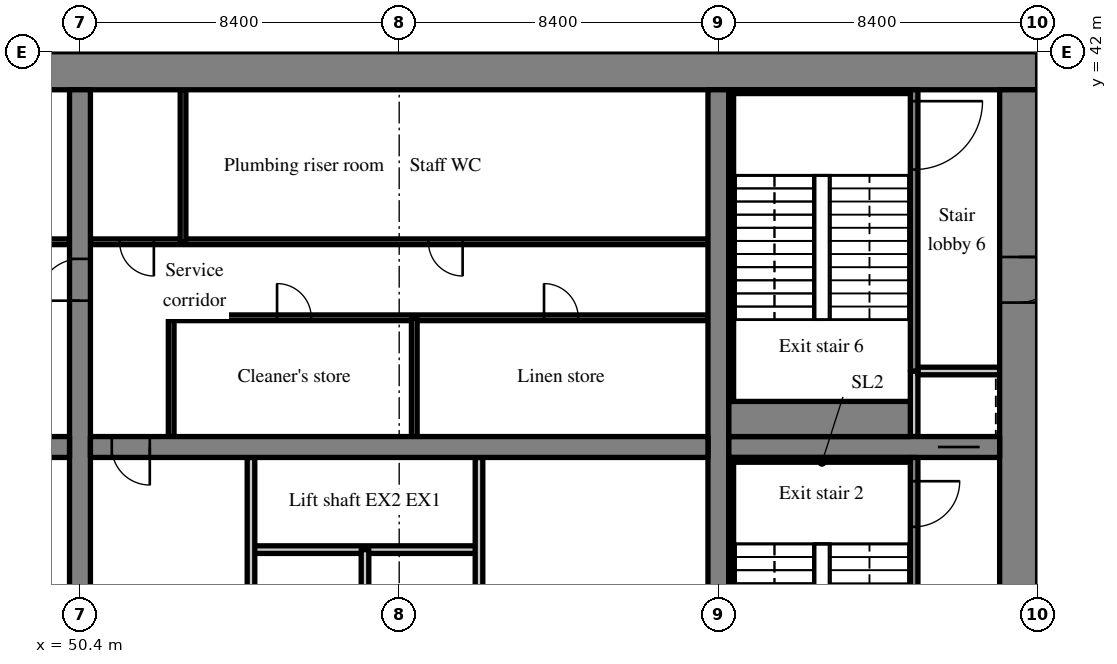
"""IFC4 building model, lengths in metres.
Left out: names, types, materials, properties, quantities, classifications, styles, units other than length and angle.
Written with IfcOpenShell. Run it as: python <this file> out.ifc"""

import sys

from ifc_helpers import new_model, si_unit, direction, frame, frame_2d, origin, place, context, subcontext, project, spatial, rectangle, extrude, source, transform, mapped, element, fill, save


model = new_model("IFC4")
c1 = context("Model", 3, precision=1e-05, world=origin(), true_north=direction((0.0, 1.0)))
c2 = subcontext(c1, "Body", "Model", "MODEL_VIEW")
j1 = project(units=[si_unit("LENGTHUNIT", "METRE"), si_unit("PLANEANGLEUNIT", "RADIAN")], contexts=[c1])
p1 = place(None, origin())
s1 = spatial("IfcSite", under=j1, at=p1, CompositionType="ELEMENT")
p2 = place(p1, origin())
s2 = spatial("IfcBuilding", under=s1, at=p2, CompositionType="ELEMENT")
p3 = place(p2, frame((0.0, 0.0, 54.4)))
s3 = spatial("IfcBuildingStorey", under=s2, at=p3, CompositionType="ELEMENT", Elevation=54.4)
m1 = source(origin(), c2, "Body", "SweptSolid", [
    extrude(rectangle(XDim=50.4, YDim=1.0, at=frame_2d((25.2, 0.0))), origin(), (0.0, 0.0, 1.0), 3.52),
])
p4 = place(p3, frame((25.2, 41.5, 0.0), z_axis=(0.0, 0.0, 1.0), x_axis=(1.0, 0.0, 0.0)))
e1 = element("IfcWall", 1, at=p4, inside=s3, PredefinedType="SHEAR", context=c2, shape_type="MappedRepresentation", body=[
    mapped(m1, transform((0.0, 0.0, 0.0), scale=1.0)),
])
m2 = source(origin(), c2, "Body", "SweptSolid", [
    extrude(rectangle(XDim=18.0, YDim=1.0, at=frame_2d((9.0, 0.0))), origin(), (0.0, 0.0, 1.0), 3.52),
])
p5 = place(p3, frame((75.1, 23.0, 0.0), z_axis=(0.0, 0.0, 1.0), x_axis=(0.0, 1.0, 0.0)))
e2 = element("IfcWall", 2, at=p5, inside=s3, PredefinedType="SHEAR", context=c2, shape_type="MappedRepresentation", body=[
    mapped(m2, transform((0.0, 0.0, 0.0), scale=1.0)),
])
m3 = source(origin(), c2, "Body", "SweptSolid", [
    extrude(rectangle(XDim=1.2, YDim=2.1, at=frame_2d((0.6, 1.05))), frame((0.0, 0.51, 0.0), z_axis=(0.0, -1.0, 0.0), x_axis=(1.0, 0.0, 0.0)), (0.0, 0.0, 1.0), 1.02),
])
p6 = place(p5, frame((12.4, 0.0, 0.0)))
e3 = element("IfcOpeningElement", 3, at=p6, cuts=e2, PredefinedType="OPENING", context=c2, shape_type="MappedRepresentation", body=[
    mapped(m3, transform((0.0, 0.0, 0.0), scale=1.0)),
])
m4 = source(origin(), c2, "Body", "SweptSolid", [
    extrude(rectangle(XDim=18.0, YDim=0.55, at=frame_2d((9.0, 0.0))), origin(), (0.0, 0.0, 1.0), 3.52),
])
p7 = place(p3, frame((50.4, 23.0, 0.0), z_axis=(0.0, 0.0, 1.0), x_axis=(0.0, 1.0, 0.0)))
e4 = element("IfcWall", 4, at=p7, inside=s3, PredefinedType="SHEAR", context=c2, shape_type="MappedRepresentation", body=[
    mapped(m4, transform((0.0, 0.0, 0.0), scale=1.0)),
])
m5 = source(origin(), c2, "Body", "SweptSolid", [
    extrude(rectangle(XDim=1.1, YDim=2.1, at=frame_2d((0.55, 1.05))), frame((0.0, 0.285, 0.0), z_axis=(0.0, -1.0, 0.0), x_axis=(1.0, 0.0, 0.0)), (0.0, 0.0, 1.0), 0.57),
])
p8 = place(p7, frame((12.45, 0.0, 0.0)))
e5 = element("IfcOpeningElement", 5, at=p8, cuts=e4, PredefinedType="OPENING", context=c2, shape_type="MappedRepresentation", body=[
    mapped(m5, transform((0.0, 0.0, 0.0), scale=1.0)),
])
p9 = place(p3, frame((67.2, 23.0, 0.0), z_axis=(0.0, 0.0, 1.0), x_axis=(0.0, 1.0, 0.0)))
e6 = element("IfcWall", 6, at=p9, inside=s3, PredefinedType="SHEAR", context=c2, shape_type="MappedRepresentation", body=[
    mapped(m4, transform((0.0, 0.0, 0.0), scale=1.0)),
])
m6 = source(origin(), c2, "Body", "SweptSolid", [
    extrude(rectangle(XDim=16.25, YDim=0.55, at=frame_2d((8.125, 0.0))), origin(), (0.0, 0.0, 1.0), 3.52),
])
p10 = place(p3, frame((33.875, 31.6, 0.0), z_axis=(0.0, 0.0, 1.0), x_axis=(1.0, 0.0, 0.0)))
e7 = element("IfcWall", 7, at=p10, inside=s3, PredefinedType="SHEAR", context=c2, shape_type="MappedRepresentation", body=[
    mapped(m6, transform((0.0, 0.0, 0.0), scale=1.0)),
])
m7 = source(origin(), c2, "Body", "SweptSolid", [
    extrude(rectangle(XDim=1.0, YDim=2.1, at=frame_2d((0.5, 1.05))), frame((0.0, 0.285, 0.0), z_axis=(0.0, -1.0, 0.0), x_axis=(1.0, 0.0, 0.0)), (0.0, 0.0, 1.0), 0.57),
])
p11 = place(p10, frame((14.687, 0.0, 0.0)))
e8 = element("IfcOpeningElement", 8, at=p11, cuts=e7, PredefinedType="OPENING", context=c2, shape_type="MappedRepresentation", body=[
    mapped(m7, transform((0.0, 0.0, 0.0), scale=1.0)),
])
p12 = place(p3, frame((50.675, 31.6, 0.0), z_axis=(0.0, 0.0, 1.0), x_axis=(1.0, 0.0, 0.0)))
e9 = element("IfcWall", 9, at=p12, inside=s3, PredefinedType="SHEAR", context=c2, shape_type="MappedRepresentation", body=[
    mapped(m6, transform((0.0, 0.0, 0.0), scale=1.0)),
])
p13 = place(p12, frame((0.562, 0.0, 0.0)))
e10 = element("IfcOpeningElement", 10, at=p13, cuts=e9, PredefinedType="OPENING", context=c2, shape_type="MappedRepresentation", body=[
    mapped(m7, transform((0.0, 0.0, 0.0), scale=1.0)),
])
m8 = source(origin(), c2, "Body", "SweptSolid", [
    extrude(rectangle(XDim=7.125, YDim=0.55, at=frame_2d((3.562, 0.0))), origin(), (0.0, 0.0, 1.0), 3.52),
])
p14 = place(p3, frame((67.475, 31.6, 0.0), z_axis=(0.0, 0.0, 1.0), x_axis=(1.0, 0.0, 0.0)))
e11 = element("IfcWall", 11, at=p14, inside=s3, PredefinedType="SHEAR", context=c2, shape_type="MappedRepresentation", body=[
    mapped(m8, transform((0.0, 0.0, 0.0), scale=1.0)),
])
p15 = place(p14, frame((5.5, 0.0, 0.0)))
e12 = element("IfcOpeningElement", 12, at=p15, cuts=e11, PredefinedType="OPENING", context=c2, shape_type="MappedRepresentation", body=[
    mapped(m5, transform((0.0, 0.0, 0.0), scale=1.0)),
])
m9 = source(origin(), c2, "Body", "SweptSolid", [
    extrude(rectangle(XDim=3.559, YDim=0.3, at=frame_2d((1.78, 0.0))), origin(), (0.0, 0.0, 1.0), 3.52),
])
p16 = place(p3, frame((76.523, 43.292, 0.0), z_axis=(0.0, 0.0, 1.0), x_axis=(-0.35779745313, -0.933799219604, 0.0)))
e13 = element("IfcWall", 13, at=p16, inside=s3, PredefinedType="SOLIDWALL", context=c2, shape_type="MappedRepresentation", body=[
    mapped(m9, transform((0.0, 0.0, 0.0), scale=1.0)),
])
m10 = source(origin(), c2, "Body", "SweptSolid", [
    extrude(rectangle(XDim=1.5, YDim=2.0, at=frame_2d((0.75, 1.0))), frame((0.0, 0.16, 0.0), z_axis=(0.0, -1.0, 0.0), x_axis=(1.0, 0.0, 0.0)), (0.0, 0.0, 1.0), 0.32),
])
p17 = place(p16, frame((0.156, 0.0, 0.9)))
e14 = element("IfcOpeningElement", 14, at=p17, cuts=e13, PredefinedType="OPENING", context=c2, shape_type="MappedRepresentation", body=[
    mapped(m10, transform((0.0, 0.0, 0.0), scale=1.0)),
])
m11 = source(origin(), c2, "Body", "SweptSolid", [
    extrude(rectangle(XDim=16.25, YDim=0.15, at=frame_2d((8.125, 0.0))), origin(), (0.0, 0.0, 1.0), 3.52),
])
p18 = place(p3, frame((33.875, 37.0, 0.0), z_axis=(0.0, 0.0, 1.0), x_axis=(1.0, 0.0, 0.0)))
e15 = element("IfcWall", 15, at=p18, inside=s3, PredefinedType="PARTITIONING", context=c2, shape_type="MappedRepresentation", body=[
    mapped(m11, transform((0.0, 0.0, 0.0), scale=1.0)),
])
m12 = source(origin(), c2, "Body", "SweptSolid", [
    extrude(rectangle(XDim=0.9, YDim=2.1, at=frame_2d((0.45, 1.05))), frame((0.0, 0.085, 0.0), z_axis=(0.0, -1.0, 0.0), x_axis=(1.0, 0.0, 0.0)), (0.0, 0.0, 1.0), 0.17),
])
p19 = place(p18, frame((0.769, 0.0, 0.0)))
e16 = element("IfcOpeningElement", 16, at=p19, cuts=e15, PredefinedType="OPENING", context=c2, shape_type="MappedRepresentation", body=[
    mapped(m12, transform((0.0, 0.0, 0.0), scale=1.0)),
])
p20 = place(p18, frame((3.613, 0.0, 0.0)))
e17 = element("IfcOpeningElement", 17, at=p20, cuts=e15, PredefinedType="OPENING", context=c2, shape_type="MappedRepresentation", body=[
    mapped(m12, transform((0.0, 0.0, 0.0), scale=1.0)),
])
p21 = place(p18, frame((9.3, 0.0, 0.0)))
e18 = element("IfcOpeningElement", 18, at=p21, cuts=e15, PredefinedType="OPENING", context=c2, shape_type="MappedRepresentation", body=[
    mapped(m12, transform((0.0, 0.0, 0.0), scale=1.0)),
])
p22 = place(p18, frame((14.581, 0.0, 0.0)))
e19 = element("IfcOpeningElement", 19, at=p22, cuts=e15, PredefinedType="OPENING", context=c2, shape_type="MappedRepresentation", body=[
    mapped(m12, transform((0.0, 0.0, 0.0), scale=1.0)),
])
m13 = source(origin(), c2, "Body", "SweptSolid", [
    extrude(rectangle(XDim=6.0, YDim=0.2, at=frame_2d((3.0, 0.0))), origin(), (0.0, 0.0, 1.0), 3.52),
])
p23 = place(p3, frame((60.9, 28.9, 0.0), z_axis=(0.0, 0.0, 1.0), x_axis=(-1.0, 0.0, 0.0)))
e20 = element("IfcWall", 20, at=p23, inside=s3, PredefinedType="SOLIDWALL", context=c2, shape_type="MappedRepresentation", body=[
    mapped(m13, transform((0.0, 0.0, 0.0), scale=1.0)),
])
m14 = source(origin(), c2, "Body", "SweptSolid", [
    extrude(rectangle(XDim=8.325, YDim=0.2, at=frame_2d((4.163, 0.0))), origin(), (0.0, 0.0, 1.0), 3.52),
])
for number, where, z_axis, x_axis in (
    (21, (54.9, 23.0, 0.0), (0.0, 0.0, 1.0), (0.0, 1.0, 0.0)),
    (22, (60.9, 23.0, 0.0), (0.0, 0.0, 1.0), (0.0, 1.0, 0.0)),
):
    element("IfcWall", number, at=place(p3, frame(where, z_axis=z_axis, x_axis=x_axis)), inside=s3, PredefinedType="PARTITIONING", context=c2, shape_type="MappedRepresentation", body=[
        mapped(m14, transform((0.0, 0.0, 0.0), scale=1.0)),
    ])
m15 = source(origin(), c2, "Body", "SweptSolid", [
    extrude(rectangle(XDim=5.9, YDim=0.2, at=frame_2d((2.95, 0.0))), origin(), (0.0, 0.0, 1.0), 3.52),
])
p24 = place(p3, frame((57.9, 23.0, 0.0), z_axis=(0.0, 0.0, 1.0), x_axis=(0.0, 1.0, 0.0)))
e23 = element("IfcWall", 23, at=p24, inside=s3, PredefinedType="PARTITIONING", context=c2, shape_type="MappedRepresentation", body=[
    mapped(m15, transform((0.0, 0.0, 0.0), scale=1.0)),
])
m16 = source(origin(), c2, "Body", "SweptSolid", [
    extrude(rectangle(XDim=3.125, YDim=0.15, at=frame_2d((1.562, 0.0))), origin(), (0.0, 0.0, 1.0), 3.52),
])
p25 = place(p3, frame((52.8, 31.875, 0.0), z_axis=(0.0, 0.0, 1.0), x_axis=(0.0, 1.0, 0.0)))
e24 = element("IfcWall", 24, at=p25, inside=s3, PredefinedType="PARTITIONING", context=c2, shape_type="MappedRepresentation", body=[
    mapped(m16, transform((0.0, 0.0, 0.0), scale=1.0)),
])
m17 = source(origin(), c2, "Body", "SweptSolid", [
    extrude(rectangle(XDim=14.125, YDim=0.15, at=frame_2d((7.062, 0.0))), origin(), (0.0, 0.0, 1.0), 3.52),
])
p26 = place(p3, frame((66.925, 35.0, 0.0), z_axis=(0.0, 0.0, 1.0), x_axis=(-1.0, 0.0, 0.0)))
e25 = element("IfcWall", 25, at=p26, inside=s3, PredefinedType="PARTITIONING", context=c2, shape_type="MappedRepresentation", body=[
    mapped(m17, transform((0.0, 0.0, 0.0), scale=1.0)),
])
p27 = place(p26, frame((3.414, 0.0, 0.0)))
e26 = element("IfcOpeningElement", 26, at=p27, cuts=e25, PredefinedType="OPENING", context=c2, shape_type="MappedRepresentation", body=[
    mapped(m12, transform((0.0, 0.0, 0.0), scale=1.0)),
])
p28 = place(p26, frame((10.439, 0.0, 0.0)))
e27 = element("IfcOpeningElement", 27, at=p28, cuts=e25, PredefinedType="OPENING", context=c2, shape_type="MappedRepresentation", body=[
    mapped(m12, transform((0.0, 0.0, 0.0), scale=1.0)),
])
p29 = place(p3, frame((66.925, 37.0, 0.0), z_axis=(0.0, 0.0, 1.0), x_axis=(-1.0, 0.0, 0.0)))
e28 = element("IfcWall", 28, at=p29, inside=s3, PredefinedType="PARTITIONING", context=c2, shape_type="MappedRepresentation", body=[
    mapped(m11, transform((0.0, 0.0, 0.0), scale=1.0)),
])
p30 = place(p29, frame((6.456, 0.0, 0.0)))
e29 = element("IfcOpeningElement", 29, at=p30, cuts=e28, PredefinedType="OPENING", context=c2, shape_type="MappedRepresentation", body=[
    mapped(m12, transform((0.0, 0.0, 0.0), scale=1.0)),
])
p31 = place(p29, frame((14.581, 0.0, 0.0)))
e30 = element("IfcOpeningElement", 30, at=p31, cuts=e28, PredefinedType="OPENING", context=c2, shape_type="MappedRepresentation", body=[
    mapped(m12, transform((0.0, 0.0, 0.0), scale=1.0)),
])
p32 = place(p3, frame((59.197, 31.875, 0.0), z_axis=(0.0, 0.0, 1.0), x_axis=(0.0, 1.0, 0.0)))
e31 = element("IfcWall", 31, at=p32, inside=s3, PredefinedType="PARTITIONING", context=c2, shape_type="MappedRepresentation", body=[
    mapped(m16, transform((0.0, 0.0, 0.0), scale=1.0)),
])
m18 = source(origin(), c2, "Body", "SweptSolid", [
    extrude(rectangle(XDim=4.0, YDim=0.15, at=frame_2d((2.0, 0.0))), origin(), (0.0, 0.0, 1.0), 3.52),
])
p33 = place(p3, frame((53.112, 37.0, 0.0), z_axis=(0.0, 0.0, 1.0), x_axis=(0.0, 1.0, 0.0)))
e32 = element("IfcWall", 32, at=p33, inside=s3, PredefinedType="PARTITIONING", context=c2, shape_type="MappedRepresentation", body=[
    mapped(m18, transform((0.0, 0.0, 0.0), scale=1.0)),
])
m19 = source(origin(), c2, "Body", "SweptSolid", [
    extrude(rectangle(XDim=8.325, YDim=0.2, at=frame_2d((4.163, 0.0))), origin(), (0.0, 0.0, 1.0), 3.52),
])
p34 = place(p3, frame((72.35, 23.0, 0.0), z_axis=(0.0, 0.0, 1.0), x_axis=(0.0, 1.0, 0.0)))
e33 = element("IfcWall", 33, at=p34, inside=s3, PredefinedType="SOLIDWALL", context=c2, shape_type="MappedRepresentation", body=[
    mapped(m19, transform((0.0, 0.0, 0.0), scale=1.0)),
])
m20 = source(origin(), c2, "Body", "SweptSolid", [
    extrude(rectangle(XDim=1.2, YDim=2.1, at=frame_2d((0.6, 1.05))), frame((0.0, 0.11, 0.0), z_axis=(0.0, -1.0, 0.0), x_axis=(1.0, 0.0, 0.0)), (0.0, 0.0, 1.0), 0.22),
])
p35 = place(p34, frame((6.5, 0.0, 0.0)))
e34 = element("IfcOpeningElement", 34, at=p35, cuts=e33, PredefinedType="OPENING", context=c2, shape_type="MappedRepresentation", body=[
    mapped(m20, transform((0.0, 0.0, 0.0), scale=1.0)),
])
m21 = source(origin(), c2, "Body", "SweptSolid", [
    extrude(rectangle(XDim=1.725, YDim=0.2, at=frame_2d((0.863, 0.0))), origin(), (0.0, 0.0, 1.0), 3.52),
])
p36 = place(p3, frame((72.35, 31.875, 0.0), z_axis=(0.0, 0.0, 1.0), x_axis=(0.0, 1.0, 0.0)))
e35 = element("IfcWall", 35, at=p36, inside=s3, PredefinedType="SOLIDWALL", context=c2, shape_type="MappedRepresentation", body=[
    mapped(m21, transform((0.0, 0.0, 0.0), scale=1.0)),
])
m22 = source(origin(), c2, "Body", "SweptSolid", [
    extrude(rectangle(XDim=2.15, YDim=0.2, at=frame_2d((1.075, 0.0))), origin(), (0.0, 0.0, 1.0), 3.52),
])
p37 = place(p3, frame((72.45, 33.6, 0.0), z_axis=(0.0, 0.0, 1.0), x_axis=(1.0, 0.0, 0.0)))
e36 = element("IfcWall", 36, at=p37, inside=s3, PredefinedType="SOLIDWALL", context=c2, shape_type="MappedRepresentation", body=[
    mapped(m22, transform((0.0, 0.0, 0.0), scale=1.0)),
])
m23 = source(origin(), c2, "Body", "SweptSolid", [
    extrude(rectangle(XDim=7.4, YDim=0.2, at=frame_2d((3.7, 0.0))), origin(), (0.0, 0.0, 1.0), 3.52),
])
p38 = place(p3, frame((72.35, 33.6, 0.0), z_axis=(0.0, 0.0, 1.0), x_axis=(0.0, 1.0, 0.0)))
e37 = element("IfcWall", 37, at=p38, inside=s3, PredefinedType="SOLIDWALL", context=c2, shape_type="MappedRepresentation", body=[
    mapped(m23, transform((0.0, 0.0, 0.0), scale=1.0)),
])
m24 = source(origin(), c2, "Body", "SweptSolid", [
    extrude(rectangle(XDim=1.8, YDim=2.1, at=frame_2d((0.9, 1.05))), frame((0.0, 0.11, 0.0), z_axis=(0.0, -1.0, 0.0), x_axis=(1.0, 0.0, 0.0)), (0.0, 0.0, 1.0), 0.22),
])
p39 = place(p38, frame((5.3, 0.0, 0.0)))
e38 = element("IfcOpeningElement", 38, at=p39, cuts=e37, PredefinedType="OPENING", context=c2, shape_type="MappedRepresentation", body=[
    mapped(m24, transform((0.0, 0.0, 0.0), scale=1.0)),
])
m25 = source(origin(), c2, "Body", "SweptSolid", [
    extrude(rectangle(XDim=8.2, YDim=0.2, at=frame_2d((4.1, 0.0))), origin(), (0.0, 0.0, 1.0), 3.52),
])
p40 = place(p3, frame((83.8, 30.4, 0.0), z_axis=(0.0, 0.0, 1.0), x_axis=(-1.0, 0.0, 0.0)))
e39 = element("IfcWall", 39, at=p40, inside=s3, PredefinedType="SOLIDWALL", context=c2, shape_type="MappedRepresentation", body=[
    mapped(m25, transform((0.0, 0.0, 0.0), scale=1.0)),
])
m26 = source(origin(), c2, "Body", "SweptSolid", [
    extrude(rectangle(XDim=1.0, YDim=2.1, at=frame_2d((0.5, 1.05))), frame((0.0, 0.11, 0.0), z_axis=(0.0, -1.0, 0.0), x_axis=(1.0, 0.0, 0.0)), (0.0, 0.0, 1.0), 0.22),
])
p41 = place(p40, frame((6.1, 0.0, 0.0)))
e40 = element("IfcOpeningElement", 40, at=p41, cuts=e39, PredefinedType="OPENING", context=c2, shape_type="MappedRepresentation", body=[
    mapped(m26, transform((0.0, 0.0, 0.0), scale=1.0)),
])
m27 = source(origin(), c2, "Body", "SweptSolid", [
    extrude(rectangle(XDim=4.775, YDim=0.125, at=frame_2d((2.387, 0.0))), origin(), (0.0, 0.0, 1.0), 3.52),
])
p42 = place(p3, frame((67.475, 31.262, 0.0), z_axis=(0.0, 0.0, 1.0), x_axis=(1.0, 0.0, 0.0)))
e41 = element("IfcWall", 41, at=p42, inside=s3, PredefinedType="SOLIDWALL", context=c2, shape_type="MappedRepresentation", body=[
    mapped(m27, transform((0.0, 0.0, 0.0), scale=1.0)),
])
m28 = source(origin(), c2, "Body", "SweptSolid", [
    extrude(rectangle(XDim=8.1, YDim=0.125, at=frame_2d((4.05, 0.0))), origin(), (0.0, 0.0, 1.0), 3.52),
])
p43 = place(p3, frame((67.537, 23.1, 0.0), z_axis=(0.0, 0.0, 1.0), x_axis=(0.0, 1.0, 0.0)))
e42 = element("IfcWall", 42, at=p43, inside=s3, PredefinedType="SOLIDWALL", context=c2, shape_type="MappedRepresentation", body=[
    mapped(m28, transform((0.0, 0.0, 0.0), scale=1.0)),
])
m29 = source(origin(), c2, "Body", "SweptSolid", [
    extrude(rectangle(XDim=4.775, YDim=0.1, at=frame_2d((2.387, 0.0))), origin(), (0.0, 0.0, 1.0), 3.52),
])
p44 = place(p3, frame((67.475, 40.95, 0.0), z_axis=(0.0, 0.0, 1.0), x_axis=(1.0, 0.0, 0.0)))
e43 = element("IfcWall", 43, at=p44, inside=s3, PredefinedType="SOLIDWALL", context=c2, shape_type="MappedRepresentation", body=[
    mapped(m29, transform((0.0, 0.0, 0.0), scale=1.0)),
])
m30 = source(origin(), c2, "Body", "SweptSolid", [
    extrude(rectangle(XDim=4.775, YDim=0.925, at=frame_2d((2.387, 0.0))), origin(), (0.0, 0.0, 1.0), 3.52),
])
p45 = place(p3, frame((67.475, 32.337, 0.0), z_axis=(0.0, 0.0, 1.0), x_axis=(1.0, 0.0, 0.0)))
e44 = element("IfcWall", 44, at=p45, inside=s3, PredefinedType="SOLIDWALL", context=c2, shape_type="MappedRepresentation", body=[
    mapped(m30, transform((0.0, 0.0, 0.0), scale=1.0)),
])
p46 = place(p3, frame((67.537, 32.8, 0.0), z_axis=(0.0, 0.0, 1.0), x_axis=(0.0, 1.0, 0.0)))
e45 = element("IfcWall", 45, at=p46, inside=s3, PredefinedType="SOLIDWALL", context=c2, shape_type="MappedRepresentation", body=[
    mapped(m28, transform((0.0, 0.0, 0.0), scale=1.0)),
])
m31 = source(origin(), c2, "Body", "SweptSolid", [
    extrude(rectangle(XDim=1.0, YDim=2.1, at=frame_2d((0.5, 1.05))), frame((0.0, 0.025, 0.0), z_axis=(0.0, -1.0, 0.0), x_axis=(1.0, 0.0, 0.0)), (0.0, 0.0, 1.0), 0.05),
])
p47 = place(p13, origin())
e46 = element("IfcDoor", 46, at=p47, inside=s3, OperationType="SINGLE_SWING_RIGHT", PredefinedType="DOOR", context=c2, shape_type="MappedRepresentation", body=[
    mapped(m31, transform((0.0, 0.0, 0.0), scale=1.0)),
])
fill(e10, e46)
m32 = source(origin(), c2, "Body", "SweptSolid", [
    extrude(rectangle(XDim=0.9, YDim=2.1, at=frame_2d((0.45, 1.05))), frame((0.0, 0.025, 0.0), z_axis=(0.0, -1.0, 0.0), x_axis=(1.0, 0.0, 0.0)), (0.0, 0.0, 1.0), 0.05),
])
p48 = place(p27, origin())
e47 = element("IfcDoor", 47, at=p48, inside=s3, OperationType="SINGLE_SWING_RIGHT", PredefinedType="DOOR", context=c2, shape_type="MappedRepresentation", body=[
    mapped(m32, transform((0.0, 0.0, 0.0), scale=1.0)),
])
fill(e26, e47)
p49 = place(p28, origin())
e48 = element("IfcDoor", 48, at=p49, inside=s3, OperationType="SINGLE_SWING_RIGHT", PredefinedType="DOOR", context=c2, shape_type="MappedRepresentation", body=[
    mapped(m32, transform((0.0, 0.0, 0.0), scale=1.0)),
])
fill(e27, e48)
p50 = place(p30, origin())
e49 = element("IfcDoor", 49, at=p50, inside=s3, OperationType="SINGLE_SWING_LEFT", PredefinedType="DOOR", context=c2, shape_type="MappedRepresentation", body=[
    mapped(m32, transform((0.0, 0.0, 0.0), scale=1.0)),
])
fill(e29, e49)
p51 = place(p31, origin())
e50 = element("IfcDoor", 50, at=p51, inside=s3, OperationType="SINGLE_SWING_LEFT", PredefinedType="DOOR", context=c2, shape_type="MappedRepresentation", body=[
    mapped(m32, transform((0.0, 0.0, 0.0), scale=1.0)),
])
fill(e30, e50)
m33 = source(origin(), c2, "Body", "SweptSolid", [
    extrude(rectangle(XDim=1.2, YDim=2.1, at=frame_2d((0.6, 1.05))), frame((0.0, 0.025, 0.0), z_axis=(0.0, -1.0, 0.0), x_axis=(1.0, 0.0, 0.0)), (0.0, 0.0, 1.0), 0.05),
])
p52 = place(p35, origin())
e51 = element("IfcDoor", 51, at=p52, inside=s3, OperationType="SINGLE_SWING_RIGHT", PredefinedType="DOOR", context=c2, shape_type="MappedRepresentation", body=[
    mapped(m33, transform((0.0, 0.0, 0.0), scale=1.0)),
])
fill(e34, e51)
m34 = source(origin(), c2, "Body", "SweptSolid", [
    extrude(rectangle(XDim=1.1, YDim=2.1, at=frame_2d((0.55, 1.05))), frame((0.0, 0.025, 0.0), z_axis=(0.0, -1.0, 0.0), x_axis=(1.0, 0.0, 0.0)), (0.0, 0.0, 1.0), 0.05),
])
p53 = place(p15, origin())
e52 = element("IfcDoor", 52, at=p53, inside=s3, OperationType="SLIDING_TO_LEFT", PredefinedType="DOOR", context=c2, shape_type="MappedRepresentation", body=[
    mapped(m34, transform((0.0, 0.0, 0.0), scale=1.0)),
])
fill(e12, e52)
m35 = source(origin(), c2, "Body", "SweptSolid", [
    extrude(rectangle(XDim=1.8, YDim=2.1, at=frame_2d((0.9, 1.05))), frame((0.0, 0.025, 0.0), z_axis=(0.0, -1.0, 0.0), x_axis=(1.0, 0.0, 0.0)), (0.0, 0.0, 1.0), 0.05),
])
p54 = place(p39, origin())
e53 = element("IfcDoor", 53, at=p54, inside=s3, OperationType="SINGLE_SWING_RIGHT", PredefinedType="DOOR", context=c2, shape_type="MappedRepresentation", body=[
    mapped(m35, transform((0.0, 0.0, 0.0), scale=1.0)),
])
fill(e38, e53)
p55 = place(p6, origin())
e54 = element("IfcDoor", 54, at=p55, inside=s3, OperationType="SINGLE_SWING_RIGHT", PredefinedType="DOOR", context=c2, shape_type="MappedRepresentation", body=[
    mapped(m33, transform((0.0, 0.0, 0.0), scale=1.0)),
])
fill(e3, e54)
p56 = place(p8, origin())
e55 = element("IfcDoor", 55, at=p56, inside=s3, OperationType="SINGLE_SWING_LEFT", PredefinedType="DOOR", context=c2, shape_type="MappedRepresentation", body=[
    mapped(m34, transform((0.0, 0.0, 0.0), scale=1.0)),
])
fill(e5, e55)
save(model, sys.argv[1])
